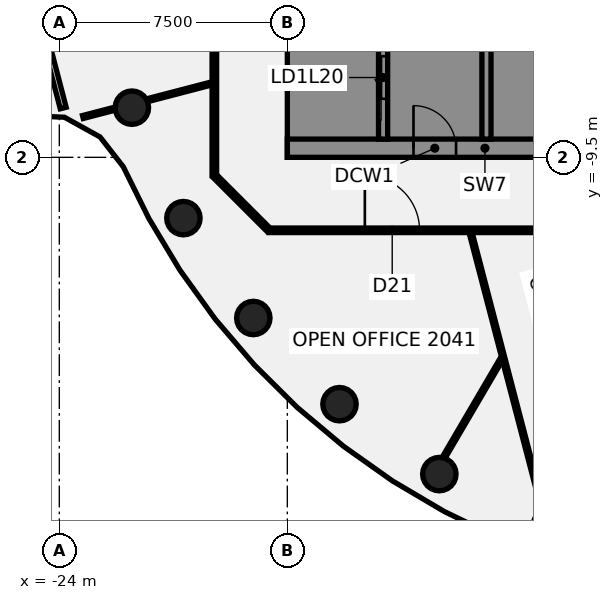
"""IFC4 building model, lengths in metres.
Left out: names, types, materials, properties, quantities, classifications, styles, units other than length and angle.
Written with IfcOpenShell. Run it as: python <this file> out.ifc"""

import sys

from ifc_helpers import new_model, si_unit, direction, frame, frame_2d, origin, origin_2d, place, context, subcontext, project, spatial, polyline, rectangle, circle, outline, extrude, element, fill, save


model = new_model("IFC4")
c1 = context("Model", 3, precision=1e-05, world=origin(), true_north=direction((0.0, 1.0)))
c2 = subcontext(c1, "Body", "Model", "MODEL_VIEW")
j1 = project(units=[si_unit("LENGTHUNIT", "METRE"), si_unit("PLANEANGLEUNIT", "RADIAN")], contexts=[c1])
p1 = place(None, origin())
s1 = spatial("IfcSite", under=j1, at=p1, CompositionType="ELEMENT")
p2 = place(p1, origin())
s2 = spatial("IfcBuilding", under=s1, at=p2, CompositionType="ELEMENT")
p3 = place(p2, frame((0.0, 0.0, 87.25)))
s3 = spatial("IfcBuildingStorey", under=s2, at=p3, CompositionType="ELEMENT", Elevation=87.25)
for number, where, z_axis, x_axis in (
    (1, (-21.613, -7.866, -0.14), (0.0, 0.0, 1.0), (1.0, 0.0, 0.0)),
    (2, (-19.919, -11.5, -0.14), (0.0, 0.0, 1.0), (1.0, 0.0, 0.0)),
    (3, (-17.619, -14.784, -0.14), (0.0, 0.0, 1.0), (1.0, 0.0, 0.0)),
    (4, (-14.784, -17.619, -0.14), (0.0, 0.0, 1.0), (1.0, 0.0, 0.0)),
    (5, (-11.5, -19.919, -0.14), (0.0, 0.0, 1.0), (1.0, 0.0, 0.0)),
    (6, (-7.866, -21.613, -0.14), (0.0, 0.0, 1.0), (1.0, 0.0, 0.0)),
):
    element("IfcColumn", number, at=place(p3, frame(where, z_axis=z_axis, x_axis=x_axis)), inside=s3, PredefinedType="COLUMN", context=c2, shape_type="SweptSolid", body=[
        extrude(circle(Radius=0.55, at=origin_2d()), origin(), (0.0, 0.0, 1.0), 3.75),
    ])
p4 = place(p3, frame((-27.369, 5.522, 0.0), z_axis=(0.0, 0.0, 1.0), x_axis=(0.252543889634, -0.967585440056, 0.0)))
e7 = element("IfcWall", 7, at=p4, inside=s3, PredefinedType="PARTITIONING", context=c2, shape_type="SweptSolid", body=[
    extrude(rectangle(XDim=13.849, YDim=0.2, at=frame_2d((6.925, 0.0))), origin(), (0.0, 0.0, 1.0), 3.01),
])
p5 = place(p4, frame((5.8, 0.0, 0.0)))
e8 = element("IfcOpeningElement", 8, at=p5, cuts=e7, PredefinedType="OPENING", context=c2, shape_type="SweptSolid", body=[
    extrude(rectangle(XDim=1.4, YDim=2.1, at=frame_2d((0.7, 1.05))), frame((0.0, 0.11, 0.0), z_axis=(0.0, -1.0, 0.0), x_axis=(1.0, 0.0, 0.0)), (0.0, 0.0, 1.0), 0.22),
])
p6 = place(p3, frame((-10.473, -11.968, 0.0), z_axis=(0.0, 0.0, 1.0), x_axis=(0.25267953947, -0.967550024719, 0.0)))
e9 = element("IfcWall", 9, at=p6, inside=s3, PredefinedType="PARTITIONING", context=c2, shape_type="SweptSolid", body=[
    extrude(rectangle(XDim=9.45, YDim=0.1, at=frame_2d((4.725, 0.0))), origin(), (0.0, 0.0, 1.0), 3.01),
])
p7 = place(p3, frame((-18.872, -10.128, 0.0), z_axis=(0.0, 0.0, 1.0), x_axis=(0.707106781187, -0.707106781187, 0.0)))
e10 = element("IfcWall", 10, at=p7, inside=s3, PredefinedType="PARTITIONING", context=c2, shape_type="SweptSolid", body=[
    extrude(rectangle(XDim=2.465, YDim=0.15, at=frame_2d((1.232, 0.0))), origin(), (0.0, 0.0, 1.0), 3.01),
])
p8 = place(p3, frame((-17.1, -11.9, 0.0), z_axis=(0.0, 0.0, 1.0), x_axis=(1.0, 0.0, 0.0)))
e11 = element("IfcWall", 11, at=p8, inside=s3, PredefinedType="PARTITIONING", context=c2, shape_type="SweptSolid", body=[
    extrude(rectangle(XDim=34.165, YDim=0.15, at=frame_2d((17.083, 0.0))), origin(), (0.0, 0.0, 1.0), 3.01),
])
p9 = place(p8, frame((13.5, 0.0, 0.0)))
e12 = element("IfcOpeningElement", 12, at=p9, cuts=e11, PredefinedType="OPENING", context=c2, shape_type="SweptSolid", body=[
    extrude(rectangle(XDim=1.8, YDim=2.1, at=frame_2d((0.9, 1.05))), frame((0.0, 0.085, 0.0), z_axis=(0.0, -1.0, 0.0), x_axis=(1.0, 0.0, 0.0)), (0.0, 0.0, 1.0), 0.17),
])
p10 = place(p8, frame((3.15, 0.0, 0.0)))
e13 = element("IfcOpeningElement", 13, at=p10, cuts=e11, PredefinedType="OPENING", context=c2, shape_type="SweptSolid", body=[
    extrude(rectangle(XDim=1.8, YDim=2.1, at=frame_2d((0.9, 1.05))), frame((0.0, 0.085, 0.0), z_axis=(0.0, -1.0, 0.0), x_axis=(1.0, 0.0, 0.0)), (0.0, 0.0, 1.0), 0.17),
])
p11 = place(p8, frame((27.269, 0.0, 0.0)))
e14 = element("IfcOpeningElement", 14, at=p11, cuts=e11, PredefinedType="OPENING", context=c2, shape_type="SweptSolid", body=[
    extrude(rectangle(XDim=1.8, YDim=2.1, at=frame_2d((0.9, 1.05))), frame((0.0, 0.085, 0.0), z_axis=(0.0, -1.0, 0.0), x_axis=(1.0, 0.0, 0.0)), (0.0, 0.0, 1.0), 0.17),
])
p12 = place(p3, frame((-23.224, -8.174, 0.0), z_axis=(0.0, 0.0, 1.0), x_axis=(0.967626742391, 0.252385592716, 0.0)))
e15 = element("IfcWall", 15, at=p12, inside=s3, PredefinedType="PARTITIONING", context=c2, shape_type="SweptSolid", body=[
    extrude(rectangle(XDim=1.095, YDim=0.1, at=frame_2d((0.547, 0.0))), origin(), (0.0, 0.0, 1.0), 3.01),
])
p13 = place(p3, frame((-21.118, -7.625, 0.0), z_axis=(0.0, 0.0, 1.0), x_axis=(0.967630105584, 0.252372698141, 0.0)))
e16 = element("IfcWall", 16, at=p13, inside=s3, PredefinedType="PARTITIONING", context=c2, shape_type="SweptSolid", body=[
    extrude(rectangle(XDim=2.222, YDim=0.1, at=frame_2d((1.111, 0.0))), origin(), (0.0, 0.0, 1.0), 3.01),
])
p14 = place(p3, frame((-11.366, -19.394, 0.0), z_axis=(0.0, 0.0, 1.0), x_axis=(0.505643154542, 0.862742719624, 0.0)))
e17 = element("IfcWall", 17, at=p14, inside=s3, PredefinedType="PARTITIONING", context=c2, shape_type="SweptSolid", body=[
    extrude(rectangle(XDim=3.775, YDim=0.1, at=frame_2d((1.888, 0.0))), origin(), (0.0, 0.0, 1.0), 3.01),
])
p15 = place(p3, frame((-18.9, -10.1, 0.0), z_axis=(0.0, 0.0, 1.0), x_axis=(0.0, 1.0, 0.0)))
e18 = element("IfcWall", 18, at=p15, inside=s3, PredefinedType="PARTITIONING", context=c2, shape_type="SweptSolid", body=[
    extrude(rectangle(XDim=20.2, YDim=0.15, at=frame_2d((10.1, 0.0))), origin(), (0.0, 0.0, 1.0), 3.01),
])
p16 = place(p15, frame((9.195, 0.0, 0.0)))
e19 = element("IfcOpeningElement", 19, at=p16, cuts=e18, PredefinedType="OPENING", context=c2, shape_type="SweptSolid", body=[
    extrude(rectangle(XDim=1.8, YDim=2.1, at=frame_2d((0.9, 1.05))), frame((0.0, 0.085, 0.0), z_axis=(0.0, -1.0, 0.0), x_axis=(1.0, 0.0, 0.0)), (0.0, 0.0, 1.0), 0.17),
])
p17 = place(p15, frame((4.704, 0.0, 0.0)))
e20 = element("IfcOpeningElement", 20, at=p17, cuts=e18, PredefinedType="OPENING", context=c2, shape_type="SweptSolid", body=[
    extrude(rectangle(XDim=1.8, YDim=2.1, at=frame_2d((0.9, 1.05))), frame((0.0, 0.085, 0.0), z_axis=(0.0, -1.0, 0.0), x_axis=(1.0, 0.0, 0.0)), (0.0, 0.0, 1.0), 0.17),
])
p18 = place(p3, frame((-16.5, -9.2, 0.0), z_axis=(0.0, 0.0, 1.0), x_axis=(1.0, 0.0, 0.0)))
e21 = element("IfcWall", 21, at=p18, inside=s3, PredefinedType="SHEAR", context=c2, shape_type="SweptSolid", body=[
    extrude(rectangle(XDim=13.0, YDim=0.6, at=frame_2d((6.5, 0.0))), origin(), (0.0, 0.0, 1.0), 3.61),
])
p19 = place(p18, frame((4.15, 0.0, 0.0)))
e22 = element("IfcOpeningElement", 22, at=p19, cuts=e21, PredefinedType="OPENING", context=c2, shape_type="SweptSolid", body=[
    extrude(rectangle(XDim=1.4, YDim=2.1, at=frame_2d((0.7, 1.05))), frame((0.0, 0.31, 0.0), z_axis=(0.0, -1.0, 0.0), x_axis=(1.0, 0.0, 0.0)), (0.0, 0.0, 1.0), 0.62),
])
p20 = place(p18, frame((10.125, 0.0, 0.0)))
e23 = element("IfcOpeningElement", 23, at=p20, cuts=e21, PredefinedType="OPENING", context=c2, shape_type="SweptSolid", body=[
    extrude(rectangle(XDim=1.4, YDim=2.1, at=frame_2d((0.7, 1.05))), frame((0.0, 0.31, 0.0), z_axis=(0.0, -1.0, 0.0), x_axis=(1.0, 0.0, 0.0)), (0.0, 0.0, 1.0), 0.62),
])
p21 = place(p3, origin())
e24 = element("IfcWall", 24, at=p21, inside=s3, PredefinedType="SHEAR", context=c2, shape_type="SweptSolid", body=[
    extrude(outline(polyline([(-13.5, -8.9), (-13.5, -8.125), (-15.9, -8.125), (-15.9, -5.625), (-13.5, -5.625), (-13.5, -5.375), (-15.9, -5.375), (-15.9, -2.875), (-13.5, -2.875), (-13.5, -2.625), (-15.9, -2.625), (-15.9, -0.125), (-13.5, -0.125), (-13.5, 0.125), (-15.9, 0.125), (-15.9, 2.625), (-13.5, 2.625), (-13.5, 2.875), (-15.9, 2.875), (-15.9, 5.375), (-13.5, 5.375), (-13.5, 5.625), (-15.9, 5.625), (-15.9, 8.125), (-13.5, 8.125), (-13.5, 8.9), (-15.9, 8.9), (-16.5, 8.9), (-16.5, -8.9), (-15.9, -8.9), (-13.5, -8.9)])), origin(), (0.0, 0.0, 1.0), 3.61),
])
p22 = place(p3, origin())
e25 = element("IfcWall", 25, at=p22, inside=s3, PredefinedType="SHEAR", context=c2, shape_type="SweptSolid", body=[
    extrude(outline(polyline([(-7.5, -8.125), (-9.55, -8.125), (-9.55, -5.625), (-9.8, -5.625), (-9.8, -8.125), (-9.8, -8.9), (-7.5, -8.9), (-7.5, -8.125)])), origin(), (0.0, 0.0, 1.0), 3.61),
])
p23 = place(p3, frame((-13.35, -8.9, 0.0), z_axis=(0.0, 0.0, 1.0), x_axis=(0.0, 1.0, 0.0)))
e26 = element("IfcWall", 26, at=p23, inside=s3, PredefinedType="SHEAR", context=c2, shape_type="SweptSolid", body=[
    extrude(rectangle(XDim=17.8, YDim=0.3, at=frame_2d((8.9, 0.0))), origin(), (0.0, 0.0, 1.0), 3.61),
])
p24 = place(p23, frame((1.325, 0.0, 0.0)))
e27 = element("IfcOpeningElement", 27, at=p24, cuts=e26, PredefinedType="OPENING", context=c2, shape_type="SweptSolid", body=[
    extrude(rectangle(XDim=1.4, YDim=2.1, at=frame_2d((0.7, 1.05))), frame((0.0, 0.16, 0.0), z_axis=(0.0, -1.0, 0.0), x_axis=(1.0, 0.0, 0.0)), (0.0, 0.0, 1.0), 0.32),
])
p25 = place(p23, frame((4.225, 0.0, 0.0)))
e28 = element("IfcOpeningElement", 28, at=p25, cuts=e26, PredefinedType="OPENING", context=c2, shape_type="SweptSolid", body=[
    extrude(rectangle(XDim=1.1, YDim=2.1, at=frame_2d((0.55, 1.05))), frame((0.0, 0.16, 0.0), z_axis=(0.0, -1.0, 0.0), x_axis=(1.0, 0.0, 0.0)), (0.0, 0.0, 1.0), 0.32),
])
p26 = place(p23, frame((6.975, 0.0, 0.0)))
e29 = element("IfcOpeningElement", 29, at=p26, cuts=e26, PredefinedType="OPENING", context=c2, shape_type="SweptSolid", body=[
    extrude(rectangle(XDim=1.1, YDim=2.1, at=frame_2d((0.55, 1.05))), frame((0.0, 0.16, 0.0), z_axis=(0.0, -1.0, 0.0), x_axis=(1.0, 0.0, 0.0)), (0.0, 0.0, 1.0), 0.32),
])
p27 = place(p23, frame((9.725, 0.0, 0.0)))
e30 = element("IfcOpeningElement", 30, at=p27, cuts=e26, PredefinedType="OPENING", context=c2, shape_type="SweptSolid", body=[
    extrude(rectangle(XDim=1.1, YDim=2.1, at=frame_2d((0.55, 1.05))), frame((0.0, 0.16, 0.0), z_axis=(0.0, -1.0, 0.0), x_axis=(1.0, 0.0, 0.0)), (0.0, 0.0, 1.0), 0.32),
])
p28 = place(p23, frame((12.475, 0.0, 0.0)))
e31 = element("IfcOpeningElement", 31, at=p28, cuts=e26, PredefinedType="OPENING", context=c2, shape_type="SweptSolid", body=[
    extrude(rectangle(XDim=1.1, YDim=2.1, at=frame_2d((0.55, 1.05))), frame((0.0, 0.16, 0.0), z_axis=(0.0, -1.0, 0.0), x_axis=(1.0, 0.0, 0.0)), (0.0, 0.0, 1.0), 0.32),
])
p29 = place(p3, frame((-9.95, -8.9, 0.0), z_axis=(0.0, 0.0, 1.0), x_axis=(0.0, 1.0, 0.0)))
e32 = element("IfcWall", 32, at=p29, inside=s3, PredefinedType="SHEAR", context=c2, shape_type="SweptSolid", body=[
    extrude(rectangle(XDim=17.8, YDim=0.3, at=frame_2d((8.9, 0.0))), origin(), (0.0, 0.0, 1.0), 3.61),
])
p30 = place(p10, frame((1.8, 0.0, 0.0), z_axis=(0.0, 0.0, 1.0), x_axis=(-1.0, 0.0, 0.0)))
e33 = element("IfcDoor", 33, at=p30, inside=s3, OperationType="DOUBLE_DOOR_SINGLE_SWING", PredefinedType="DOOR", context=c2, shape_type="SweptSolid", body=[
    extrude(rectangle(XDim=1.8, YDim=2.1, at=frame_2d((0.9, 1.05))), frame((0.0, 0.025, 0.0), z_axis=(0.0, -1.0, 0.0), x_axis=(1.0, 0.0, 0.0)), (0.0, 0.0, 1.0), 0.05),
])
fill(e13, e33)
p31 = place(p19, origin())
e34 = element("IfcDoor", 34, at=p31, inside=s3, OperationType="SINGLE_SWING_LEFT", PredefinedType="DOOR", context=c2, shape_type="SweptSolid", body=[
    extrude(rectangle(XDim=1.4, YDim=2.1, at=frame_2d((0.7, 1.05))), frame((0.0, 0.025, 0.0), z_axis=(0.0, -1.0, 0.0), x_axis=(1.0, 0.0, 0.0)), (0.0, 0.0, 1.0), 0.05),
])
fill(e22, e34)
p32 = place(p24, origin())
e35 = element("IfcDoor", 35, at=p32, inside=s3, OperationType="SLIDING_TO_LEFT", PredefinedType="DOOR", context=c2, shape_type="SweptSolid", body=[
    extrude(rectangle(XDim=1.4, YDim=2.1, at=frame_2d((0.7, 1.05))), frame((0.0, 0.025, 0.0), z_axis=(0.0, -1.0, 0.0), x_axis=(1.0, 0.0, 0.0)), (0.0, 0.0, 1.0), 0.05),
])
fill(e27, e35)
save(model, sys.argv[1])
